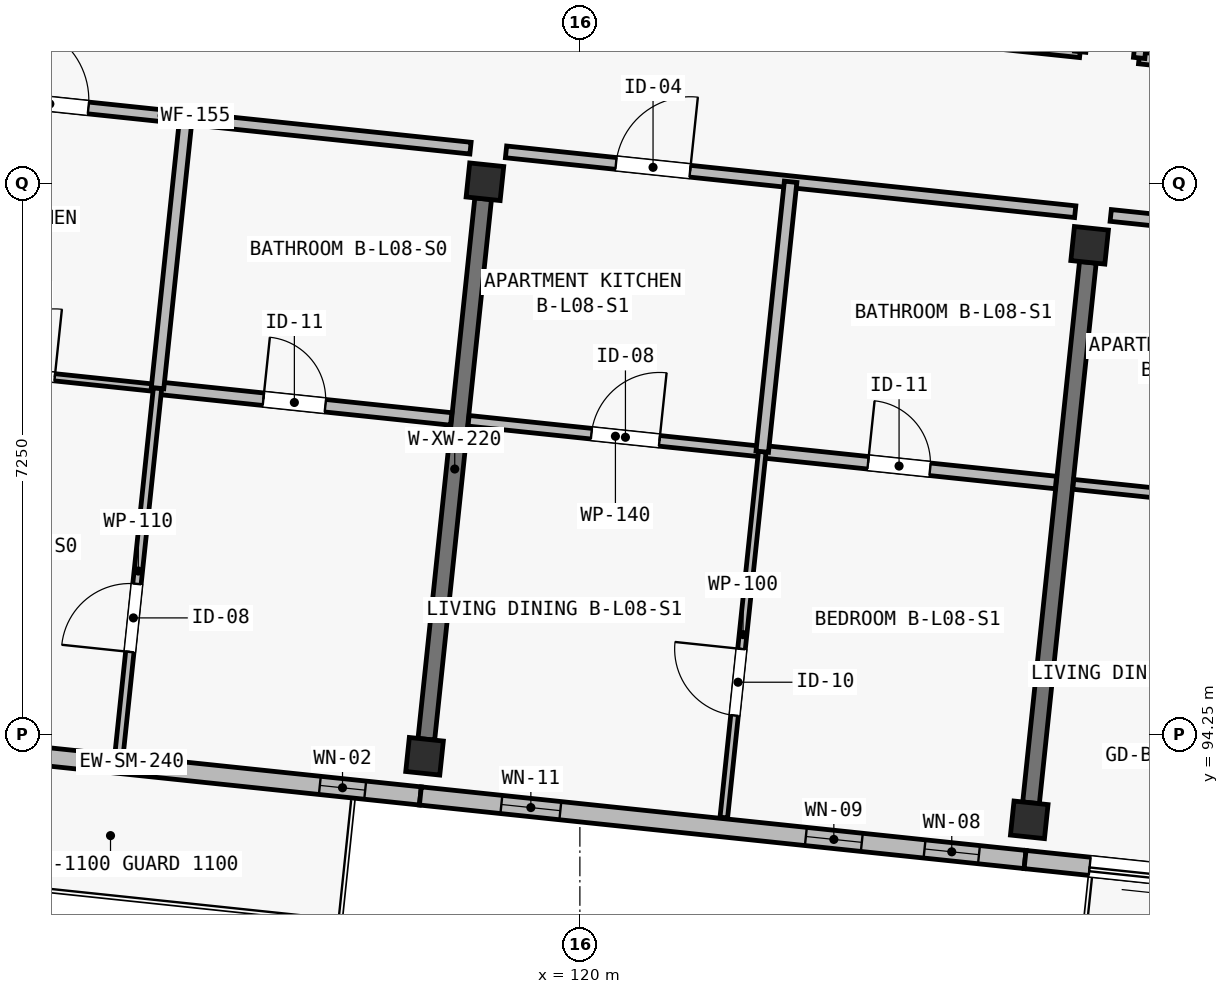
"""IFC4 building model, lengths in metres.
Left out: names, types, materials, properties, quantities, classifications, styles, units other than length and angle.
Written with IfcOpenShell. Run it as: python <this file> out.ifc"""

import sys

from ifc_helpers import new_model, si_unit, direction, frame, frame_2d, origin, origin_2d, place, context, subcontext, project, spatial, rectangle, extrude, element, fill, save


model = new_model("IFC4")
c1 = context("Model", 3, precision=1e-05, world=origin(), true_north=direction((0.0, 1.0)))
c2 = subcontext(c1, "Body", "Model", "MODEL_VIEW")
j1 = project(units=[si_unit("LENGTHUNIT", "METRE"), si_unit("PLANEANGLEUNIT", "RADIAN")], contexts=[c1])
p1 = place(None, origin())
s1 = spatial("IfcSite", under=j1, at=p1, CompositionType="ELEMENT")
p2 = place(p1, origin())
s2 = spatial("IfcBuilding", under=s1, at=p2, CompositionType="ELEMENT")
p3 = place(p2, frame((0.0, 0.0, 27.9)))
s3 = spatial("IfcBuildingStorey", under=s2, at=p3, CompositionType="ELEMENT", Elevation=27.9)
for number, where, z_axis, x_axis in (
    (1, (117.956, 93.964, 0.0), (0.0, 0.0, 1.0), (0.995, -0.105, 0.0)),
    (2, (118.75, 101.522, 0.0), (0.0, 0.0, 1.0), (0.995, -0.105, 0.0)),
    (3, (125.912, 93.127, 0.0), (0.0, 0.0, 1.0), (0.995, -0.105, 0.0)),
    (4, (126.707, 100.686, 0.0), (0.0, 0.0, 1.0), (0.995, -0.105, 0.0)),
):
    element("IfcColumn", number, at=place(p3, frame(where, z_axis=z_axis, x_axis=x_axis)), inside=s3, PredefinedType="COLUMN", context=c2, shape_type="SweptSolid", body=[
        extrude(rectangle(XDim=0.45, YDim=0.45, at=origin_2d()), origin(), (0.0, 0.0, 1.0), 3.25),
    ])
p4 = place(p3, frame((117.98, 94.188, 0.0), z_axis=(0.0, 0.0, 1.0), x_axis=(0.104519481265, 0.994522839374, 0.0)))
e5 = element("IfcWall", 5, at=p4, inside=s3, PredefinedType="SHEAR", context=c2, shape_type="SweptSolid", body=[
    extrude(rectangle(XDim=7.15, YDim=0.22, at=frame_2d((3.575, 0.0))), origin(), (0.0, 0.0, 1.0), 2.5),
])
p5 = place(p3, frame((125.936, 93.351, 0.0), z_axis=(0.0, 0.0, 1.0), x_axis=(0.104553253602, 0.994519289487, 0.0)))
e6 = element("IfcWall", 6, at=p5, inside=s3, PredefinedType="SHEAR", context=c2, shape_type="SweptSolid", body=[
    extrude(rectangle(XDim=7.15, YDim=0.22, at=frame_2d((3.575, 0.0))), origin(), (0.0, 0.0, 1.0), 2.5),
])
p6 = place(p3, frame((117.901, 93.442, 0.0), z_axis=(0.0, 0.0, 1.0), x_axis=(-0.994521760736, 0.104529744196, 0.0)))
e7 = element("IfcWall", 7, at=p6, inside=s3, PredefinedType="SOLIDWALL", context=c2, shape_type="SweptSolid", body=[
    extrude(rectangle(XDim=8.525, YDim=0.24, at=frame_2d((4.262, 0.0))), origin(), (0.0, 0.0, 1.0), 3.0),
])
p7 = place(p6, frame((5.495, 0.0, 0.0)))
e8 = element("IfcOpeningElement", 8, at=p7, cuts=e7, PredefinedType="OPENING", context=c2, shape_type="SweptSolid", body=[
    extrude(rectangle(XDim=1.5, YDim=2.12, at=frame_2d((0.75, 1.06))), frame((0.0, 0.135, 0.0), z_axis=(0.0, -1.0, 0.0), x_axis=(1.0, 0.0, 0.0)), (0.0, 0.0, 1.0), 0.27),
])
p8 = place(p6, frame((0.73, 0.0, 0.5)))
e9 = element("IfcOpeningElement", 9, at=p8, cuts=e7, PredefinedType="OPENING", context=c2, shape_type="SweptSolid", body=[
    extrude(rectangle(XDim=0.6, YDim=2.22, at=frame_2d((0.3, 1.11))), frame((0.0, 0.135, 0.0), z_axis=(0.0, -1.0, 0.0), x_axis=(1.0, 0.0, 0.0)), (0.0, 0.0, 1.0), 0.27),
])
p9 = place(p3, frame((125.857, 92.605, 0.0), z_axis=(0.0, 0.0, 1.0), x_axis=(-0.994522329422, 0.104524333444, 0.0)))
e10 = element("IfcWall", 10, at=p9, inside=s3, PredefinedType="SOLIDWALL", context=c2, shape_type="SweptSolid", body=[
    extrude(rectangle(XDim=8.0, YDim=0.24, at=frame_2d((4.0, 0.0))), origin(), (0.0, 0.0, 1.0), 3.0),
])
p10 = place(p9, frame((0.61, 0.0, 0.42)))
e11 = element("IfcOpeningElement", 11, at=p10, cuts=e10, PredefinedType="OPENING", context=c2, shape_type="SweptSolid", body=[
    extrude(rectangle(XDim=0.72, YDim=2.16, at=frame_2d((0.36, 1.08))), frame((0.0, 0.135, 0.0), z_axis=(0.0, -1.0, 0.0), x_axis=(1.0, 0.0, 0.0)), (0.0, 0.0, 1.0), 0.27),
])
p11 = place(p9, frame((2.16, 0.0, 0.48)))
e12 = element("IfcOpeningElement", 12, at=p11, cuts=e10, PredefinedType="OPENING", context=c2, shape_type="SweptSolid", body=[
    extrude(rectangle(XDim=0.74, YDim=2.26, at=frame_2d((0.37, 1.13))), frame((0.0, 0.135, 0.0), z_axis=(0.0, -1.0, 0.0), x_axis=(1.0, 0.0, 0.0)), (0.0, 0.0, 1.0), 0.27),
])
p12 = place(p9, frame((6.148, 0.0, 0.42)))
e13 = element("IfcOpeningElement", 13, at=p12, cuts=e10, PredefinedType="OPENING", context=c2, shape_type="SweptSolid", body=[
    extrude(rectangle(XDim=0.78, YDim=2.2, at=frame_2d((0.39, 1.1))), frame((0.0, 0.135, 0.0), z_axis=(0.0, -1.0, 0.0), x_axis=(1.0, 0.0, 0.0)), (0.0, 0.0, 1.0), 0.27),
])
p13 = place(p3, frame((133.814, 91.769, 0.0), z_axis=(0.0, 0.0, 1.0), x_axis=(-0.994522662826, 0.104521161134, 0.0)))
e14 = element("IfcWall", 14, at=p13, inside=s3, PredefinedType="SOLIDWALL", context=c2, shape_type="SweptSolid", body=[
    extrude(rectangle(XDim=8.0, YDim=0.24, at=frame_2d((4.0, 0.0))), origin(), (0.0, 0.0, 1.0), 3.0),
])
p14 = place(p13, frame((5.345, 0.0, 0.0)))
e15 = element("IfcOpeningElement", 15, at=p14, cuts=e14, PredefinedType="OPENING", context=c2, shape_type="SweptSolid", body=[
    extrude(rectangle(XDim=1.8, YDim=2.12, at=frame_2d((0.9, 1.06))), frame((0.0, 0.135, 0.0), z_axis=(0.0, -1.0, 0.0), x_axis=(1.0, 0.0, 0.0)), (0.0, 0.0, 1.0), 0.27),
])
p15 = place(p13, frame((0.93, 0.0, 0.46)))
e16 = element("IfcOpeningElement", 16, at=p15, cuts=e14, PredefinedType="OPENING", context=c2, shape_type="SweptSolid", body=[
    extrude(rectangle(XDim=0.72, YDim=2.16, at=frame_2d((0.36, 1.08))), frame((0.0, 0.135, 0.0), z_axis=(0.0, -1.0, 0.0), x_axis=(1.0, 0.0, 0.0)), (0.0, 0.0, 1.0), 0.27),
])
p16 = place(p3, frame((110.446, 102.817, 0.0), z_axis=(0.0, 0.0, 1.0), x_axis=(0.994520852686, -0.104538383252, 0.0)))
e17 = element("IfcWall", 17, at=p16, inside=s3, PredefinedType="PARTITIONING", context=c2, shape_type="SweptSolid", body=[
    extrude(rectangle(XDim=8.16, YDim=0.155, at=frame_2d((4.08, 0.0))), origin(), (0.0, 0.0, 1.0), 2.97),
])
p17 = place(p16, frame((2.085, 0.0, 0.0)))
e18 = element("IfcOpeningElement", 18, at=p17, cuts=e17, PredefinedType="OPENING", context=c2, shape_type="SweptSolid", body=[
    extrude(rectangle(XDim=1.02, YDim=2.2, at=frame_2d((0.51, 1.1))), frame((0.0, 0.093, 0.0), z_axis=(0.0, -1.0, 0.0), x_axis=(1.0, 0.0, 0.0)), (0.0, 0.0, 1.0), 0.185),
])
p18 = place(p3, frame((110.072, 99.267, 0.0), z_axis=(0.0, 0.0, 1.0), x_axis=(0.994526434513, -0.104485267165, 0.0)))
e19 = element("IfcWall", 19, at=p18, inside=s3, PredefinedType="PARTITIONING", context=c2, shape_type="SweptSolid", body=[
    extrude(rectangle(XDim=4.395, YDim=0.095, at=frame_2d((2.198, 0.0))), origin(), (0.0, 0.0, 1.0), 2.97),
])
p19 = place(p18, frame((2.135, 0.0, 0.0)))
e20 = element("IfcOpeningElement", 20, at=p19, cuts=e19, PredefinedType="OPENING", context=c2, shape_type="SweptSolid", body=[
    extrude(rectangle(XDim=0.9, YDim=2.1, at=frame_2d((0.45, 1.05))), frame((0.0, 0.062, 0.0), z_axis=(0.0, -1.0, 0.0), x_axis=(1.0, 0.0, 0.0)), (0.0, 0.0, 1.0), 0.125),
])
p20 = place(p3, frame((114.443, 98.808, 0.0), z_axis=(0.0, 0.0, 1.0), x_axis=(0.994517154753, -0.104573557378, 0.0)))
e21 = element("IfcWall", 21, at=p20, inside=s3, PredefinedType="PLUMBINGWALL", context=c2, shape_type="SweptSolid", body=[
    extrude(rectangle(XDim=3.885, YDim=0.165, at=frame_2d((1.942, 0.0))), origin(), (0.0, 0.0, 1.0), 2.97),
])
p21 = place(p20, frame((1.4, 0.0, 0.0)))
e22 = element("IfcOpeningElement", 22, at=p21, cuts=e21, PredefinedType="OPENING", context=c2, shape_type="SweptSolid", body=[
    extrude(rectangle(XDim=0.82, YDim=2.08, at=frame_2d((0.41, 1.04))), frame((0.0, 0.097, 0.0), z_axis=(0.0, -1.0, 0.0), x_axis=(1.0, 0.0, 0.0)), (0.0, 0.0, 1.0), 0.195),
])
p22 = place(p3, frame((113.937, 93.994, 0.0), z_axis=(0.0, 0.0, 1.0), x_axis=(0.104566624716, 0.994517883698, 0.0)))
e23 = element("IfcWall", 23, at=p22, inside=s3, PredefinedType="PARTITIONING", context=c2, shape_type="SweptSolid", body=[
    extrude(rectangle(XDim=4.84, YDim=0.11, at=frame_2d((2.42, 0.0))), origin(), (0.0, 0.0, 1.0), 2.97),
])
p23 = place(p22, frame((1.35, 0.0, 0.0)))
e24 = element("IfcOpeningElement", 24, at=p23, cuts=e23, PredefinedType="OPENING", context=c2, shape_type="SweptSolid", body=[
    extrude(rectangle(XDim=0.9, YDim=2.1, at=frame_2d((0.45, 1.05))), frame((0.0, 0.07, 0.0), z_axis=(0.0, -1.0, 0.0), x_axis=(1.0, 0.0, 0.0)), (0.0, 0.0, 1.0), 0.14),
])
p24 = place(p3, frame((114.443, 98.808, 0.0), z_axis=(0.0, 0.0, 1.0), x_axis=(0.104499661737, 0.994524922109, 0.0)))
e25 = element("IfcWall", 25, at=p24, inside=s3, PredefinedType="PLUMBINGWALL", context=c2, shape_type="SweptSolid", body=[
    extrude(rectangle(XDim=3.57, YDim=0.165, at=frame_2d((1.785, 0.0))), origin(), (0.0, 0.0, 1.0), 2.97),
])
p25 = place(p3, frame((119.028, 101.915, 0.0), z_axis=(0.0, 0.0, 1.0), x_axis=(0.994521430918, -0.10453288212, 0.0)))
e26 = element("IfcWall", 26, at=p25, inside=s3, PredefinedType="PARTITIONING", context=c2, shape_type="SweptSolid", body=[
    extrude(rectangle(XDim=7.53, YDim=0.155, at=frame_2d((3.765, 0.0))), origin(), (0.0, 0.0, 1.0), 2.97),
])
p26 = place(p25, frame((1.455, 0.0, 0.0)))
e27 = element("IfcOpeningElement", 27, at=p26, cuts=e26, PredefinedType="OPENING", context=c2, shape_type="SweptSolid", body=[
    extrude(rectangle(XDim=0.98, YDim=2.15, at=frame_2d((0.49, 1.075))), frame((0.0, 0.093, 0.0), z_axis=(0.0, -1.0, 0.0), x_axis=(1.0, 0.0, 0.0)), (0.0, 0.0, 1.0), 0.185),
])
p27 = place(p3, frame((118.536, 98.377, 0.0), z_axis=(0.0, 0.0, 1.0), x_axis=(0.994517841934, -0.104567021925, 0.0)))
e28 = element("IfcWall", 28, at=p27, inside=s3, PredefinedType="PARTITIONING", context=c2, shape_type="SweptSolid", body=[
    extrude(rectangle(XDim=3.885, YDim=0.14, at=frame_2d((1.942, 0.0))), origin(), (0.0, 0.0, 1.0), 2.97),
])
p28 = place(p27, frame((1.625, 0.0, 0.0)))
e29 = element("IfcOpeningElement", 29, at=p28, cuts=e28, PredefinedType="OPENING", context=c2, shape_type="SweptSolid", body=[
    extrude(rectangle(XDim=0.9, YDim=2.1, at=frame_2d((0.45, 1.05))), frame((0.0, 0.085, 0.0), z_axis=(0.0, -1.0, 0.0), x_axis=(1.0, 0.0, 0.0)), (0.0, 0.0, 1.0), 0.17),
])
p29 = place(p3, frame((122.399, 97.971, 0.0), z_axis=(0.0, 0.0, 1.0), x_axis=(0.994524375082, -0.104504867671, 0.0)))
e30 = element("IfcWall", 30, at=p29, inside=s3, PredefinedType="PLUMBINGWALL", context=c2, shape_type="SweptSolid", body=[
    extrude(rectangle(XDim=3.885, YDim=0.165, at=frame_2d((1.942, 0.0))), origin(), (0.0, 0.0, 1.0), 2.97),
])
p30 = place(p29, frame((1.4, 0.0, 0.0)))
e31 = element("IfcOpeningElement", 31, at=p30, cuts=e30, PredefinedType="OPENING", context=c2, shape_type="SweptSolid", body=[
    extrude(rectangle(XDim=0.82, YDim=2.08, at=frame_2d((0.41, 1.04))), frame((0.0, 0.097, 0.0), z_axis=(0.0, -1.0, 0.0), x_axis=(1.0, 0.0, 0.0)), (0.0, 0.0, 1.0), 0.195),
])
p31 = place(p3, frame((121.894, 93.158, 0.0), z_axis=(0.0, 0.0, 1.0), x_axis=(0.104516733692, 0.994523128126, 0.0)))
e32 = element("IfcWall", 32, at=p31, inside=s3, PredefinedType="PARTITIONING", context=c2, shape_type="SweptSolid", body=[
    extrude(rectangle(XDim=4.84, YDim=0.1, at=frame_2d((2.42, 0.0))), origin(), (0.0, 0.0, 1.0), 2.97),
])
p32 = place(p31, frame((1.35, 0.0, 0.0)))
e33 = element("IfcOpeningElement", 33, at=p32, cuts=e32, PredefinedType="OPENING", context=c2, shape_type="SweptSolid", body=[
    extrude(rectangle(XDim=0.88, YDim=2.1, at=frame_2d((0.44, 1.05))), frame((0.0, 0.065, 0.0), z_axis=(0.0, -1.0, 0.0), x_axis=(1.0, 0.0, 0.0)), (0.0, 0.0, 1.0), 0.13),
])
p33 = place(p3, frame((122.399, 97.971, 0.0), z_axis=(0.0, 0.0, 1.0), x_axis=(0.104492554633, 0.994525668862, 0.0)))
e34 = element("IfcWall", 34, at=p33, inside=s3, PredefinedType="PLUMBINGWALL", context=c2, shape_type="SweptSolid", body=[
    extrude(rectangle(XDim=3.57, YDim=0.165, at=frame_2d((1.785, 0.0))), origin(), (0.0, 0.0, 1.0), 2.97),
])
p34 = place(p3, frame((126.984, 101.079, 0.0), z_axis=(0.0, 0.0, 1.0), x_axis=(0.994521785195, -0.104529511491, 0.0)))
e35 = element("IfcWall", 35, at=p34, inside=s3, PredefinedType="PARTITIONING", context=c2, shape_type="SweptSolid", body=[
    extrude(rectangle(XDim=7.53, YDim=0.155, at=frame_2d((3.765, 0.0))), origin(), (0.0, 0.0, 1.0), 2.97),
])
p35 = place(p34, frame((1.455, 0.0, 0.0)))
e36 = element("IfcOpeningElement", 36, at=p35, cuts=e35, PredefinedType="OPENING", context=c2, shape_type="SweptSolid", body=[
    extrude(rectangle(XDim=1.02, YDim=2.2, at=frame_2d((0.51, 1.1))), frame((0.0, 0.093, 0.0), z_axis=(0.0, -1.0, 0.0), x_axis=(1.0, 0.0, 0.0)), (0.0, 0.0, 1.0), 0.185),
])
p36 = place(p3, frame((126.492, 97.541, 0.0), z_axis=(0.0, 0.0, 1.0), x_axis=(0.994517154753, -0.104573557378, 0.0)))
e37 = element("IfcWall", 37, at=p36, inside=s3, PredefinedType="PARTITIONING", context=c2, shape_type="SweptSolid", body=[
    extrude(rectangle(XDim=3.885, YDim=0.13, at=frame_2d((1.942, 0.0))), origin(), (0.0, 0.0, 1.0), 2.97),
])
p37 = place(p36, frame((1.625, 0.0, 0.0)))
e38 = element("IfcOpeningElement", 38, at=p37, cuts=e37, PredefinedType="OPENING", context=c2, shape_type="SweptSolid", body=[
    extrude(rectangle(XDim=0.88, YDim=2.1, at=frame_2d((0.44, 1.05))), frame((0.0, 0.08, 0.0), z_axis=(0.0, -1.0, 0.0), x_axis=(1.0, 0.0, 0.0)), (0.0, 0.0, 1.0), 0.16),
])
p38 = place(p3, frame((119.402, 103.988, 0.0), z_axis=(0.0, 0.0, 1.0), x_axis=(0.994522671024, -0.104521083137, 0.0)))
e39 = element("IfcWall", 39, at=p38, inside=s3, PredefinedType="PARTITIONING", context=c2, shape_type="SweptSolid", body=[
    extrude(rectangle(XDim=7.22, YDim=0.155, at=frame_2d((3.61, 0.0))), origin(), (0.0, 0.0, 1.0), 2.97),
])
p39 = place(p38, frame((1.305, 0.0, 0.0)))
e40 = element("IfcOpeningElement", 40, at=p39, cuts=e39, PredefinedType="OPENING", context=c2, shape_type="SweptSolid", body=[
    extrude(rectangle(XDim=1.02, YDim=2.2, at=frame_2d((0.51, 1.1))), frame((0.0, 0.093, 0.0), z_axis=(0.0, -1.0, 0.0), x_axis=(1.0, 0.0, 0.0)), (0.0, 0.0, 1.0), 0.185),
])
p40 = place(p3, frame((126.582, 103.233, 0.0), z_axis=(0.0, 0.0, 1.0), x_axis=(0.10453284543, 0.994521434775, 0.0)))
e41 = element("IfcWall", 41, at=p40, inside=s3, PredefinedType="PARTITIONING", context=c2, shape_type="SweptSolid", body=[
    extrude(rectangle(XDim=9.87, YDim=0.15, at=frame_2d((4.935, 0.0))), origin(), (0.0, 0.0, 1.0), 2.97),
])
p41 = place(p3, frame((127.358, 103.151, 0.0), z_axis=(0.0, 0.0, 1.0), x_axis=(0.994522671024, -0.104521083137, 0.0)))
e42 = element("IfcWall", 42, at=p41, inside=s3, PredefinedType="PARTITIONING", context=c2, shape_type="SweptSolid", body=[
    extrude(rectangle(XDim=7.22, YDim=0.155, at=frame_2d((3.61, 0.0))), origin(), (0.0, 0.0, 1.0), 2.97),
])
p42 = place(p41, frame((1.305, 0.0, 0.0)))
e43 = element("IfcOpeningElement", 43, at=p42, cuts=e42, PredefinedType="OPENING", context=c2, shape_type="SweptSolid", body=[
    extrude(rectangle(XDim=0.98, YDim=2.15, at=frame_2d((0.49, 1.075))), frame((0.0, 0.093, 0.0), z_axis=(0.0, -1.0, 0.0), x_axis=(1.0, 0.0, 0.0)), (0.0, 0.0, 1.0), 0.185),
])
p43 = place(p3, frame((127.358, 103.151, 0.0), z_axis=(0.0, 0.0, 1.0), x_axis=(0.104508379977, 0.994524006002, 0.0)))
e44 = element("IfcWall", 44, at=p43, inside=s3, PredefinedType="PARTITIONING", context=c2, shape_type="SweptSolid", body=[
    extrude(rectangle(XDim=9.87, YDim=0.15, at=frame_2d((4.935, 0.0))), origin(), (0.0, 0.0, 1.0), 2.97),
])
p44 = place(p8, origin())
e45 = element("IfcWindow", 45, at=p44, inside=s3, PartitioningType="SINGLE_PANEL", PredefinedType="WINDOW", context=c2, shape_type="SweptSolid", body=[
    extrude(rectangle(XDim=0.6, YDim=2.22, at=frame_2d((0.3, 1.11))), frame((0.0, 0.03, 0.0), z_axis=(0.0, -1.0, 0.0), x_axis=(1.0, 0.0, 0.0)), (0.0, 0.0, 1.0), 0.06),
])
fill(e9, e45)
p45 = place(p10, origin())
e46 = element("IfcWindow", 46, at=p45, inside=s3, PartitioningType="SINGLE_PANEL", PredefinedType="WINDOW", context=c2, shape_type="SweptSolid", body=[
    extrude(rectangle(XDim=0.72, YDim=2.16, at=frame_2d((0.36, 1.08))), frame((0.0, 0.03, 0.0), z_axis=(0.0, -1.0, 0.0), x_axis=(1.0, 0.0, 0.0)), (0.0, 0.0, 1.0), 0.06),
])
fill(e11, e46)
p46 = place(p11, origin())
e47 = element("IfcWindow", 47, at=p46, inside=s3, PartitioningType="SINGLE_PANEL", PredefinedType="WINDOW", context=c2, shape_type="SweptSolid", body=[
    extrude(rectangle(XDim=0.74, YDim=2.26, at=frame_2d((0.37, 1.13))), frame((0.0, 0.03, 0.0), z_axis=(0.0, -1.0, 0.0), x_axis=(1.0, 0.0, 0.0)), (0.0, 0.0, 1.0), 0.06),
])
fill(e12, e47)
p47 = place(p12, origin())
e48 = element("IfcWindow", 48, at=p47, inside=s3, PartitioningType="SINGLE_PANEL", PredefinedType="WINDOW", context=c2, shape_type="SweptSolid", body=[
    extrude(rectangle(XDim=0.78, YDim=2.2, at=frame_2d((0.39, 1.1))), frame((0.0, 0.03, 0.0), z_axis=(0.0, -1.0, 0.0), x_axis=(1.0, 0.0, 0.0)), (0.0, 0.0, 1.0), 0.06),
])
fill(e13, e48)
p48 = place(p14, origin())
e49 = element("IfcDoor", 49, at=p48, inside=s3, OperationType="SLIDING_TO_LEFT", PredefinedType="DOOR", context=c2, shape_type="SweptSolid", body=[
    extrude(rectangle(XDim=1.8, YDim=2.12, at=frame_2d((0.9, 1.06))), frame((0.0, 0.025, 0.0), z_axis=(0.0, -1.0, 0.0), x_axis=(1.0, 0.0, 0.0)), (0.0, 0.0, 1.0), 0.05),
])
fill(e15, e49)
p49 = place(p17, origin())
e50 = element("IfcDoor", 50, at=p49, inside=s3, OperationType="SINGLE_SWING_LEFT", PredefinedType="DOOR", context=c2, shape_type="SweptSolid", body=[
    extrude(rectangle(XDim=1.02, YDim=2.2, at=frame_2d((0.51, 1.1))), frame((0.0, 0.025, 0.0), z_axis=(0.0, -1.0, 0.0), x_axis=(1.0, 0.0, 0.0)), (0.0, 0.0, 1.0), 0.05),
])
fill(e18, e50)
p50 = place(p19, origin())
e51 = element("IfcDoor", 51, at=p50, inside=s3, OperationType="SINGLE_SWING_RIGHT", PredefinedType="DOOR", context=c2, shape_type="SweptSolid", body=[
    extrude(rectangle(XDim=0.9, YDim=2.1, at=frame_2d((0.45, 1.05))), frame((0.0, 0.025, 0.0), z_axis=(0.0, -1.0, 0.0), x_axis=(1.0, 0.0, 0.0)), (0.0, 0.0, 1.0), 0.05),
])
fill(e20, e51)
p51 = place(p21, origin())
e52 = element("IfcDoor", 52, at=p51, inside=s3, OperationType="SINGLE_SWING_LEFT", PredefinedType="DOOR", context=c2, shape_type="SweptSolid", body=[
    extrude(rectangle(XDim=0.82, YDim=2.08, at=frame_2d((0.41, 1.04))), frame((0.0, 0.025, 0.0), z_axis=(0.0, -1.0, 0.0), x_axis=(1.0, 0.0, 0.0)), (0.0, 0.0, 1.0), 0.05),
])
fill(e22, e52)
p52 = place(p23, origin())
e53 = element("IfcDoor", 53, at=p52, inside=s3, OperationType="SINGLE_SWING_LEFT", PredefinedType="DOOR", context=c2, shape_type="SweptSolid", body=[
    extrude(rectangle(XDim=0.9, YDim=2.1, at=frame_2d((0.45, 1.05))), frame((0.0, 0.025, 0.0), z_axis=(0.0, -1.0, 0.0), x_axis=(1.0, 0.0, 0.0)), (0.0, 0.0, 1.0), 0.05),
])
fill(e24, e53)
p53 = place(p26, origin())
e54 = element("IfcDoor", 54, at=p53, inside=s3, OperationType="SINGLE_SWING_RIGHT", PredefinedType="DOOR", context=c2, shape_type="SweptSolid", body=[
    extrude(rectangle(XDim=0.98, YDim=2.15, at=frame_2d((0.49, 1.075))), frame((0.0, 0.025, 0.0), z_axis=(0.0, -1.0, 0.0), x_axis=(1.0, 0.0, 0.0)), (0.0, 0.0, 1.0), 0.05),
])
fill(e27, e54)
p54 = place(p28, origin())
e55 = element("IfcDoor", 55, at=p54, inside=s3, OperationType="SINGLE_SWING_RIGHT", PredefinedType="DOOR", context=c2, shape_type="SweptSolid", body=[
    extrude(rectangle(XDim=0.9, YDim=2.1, at=frame_2d((0.45, 1.05))), frame((0.0, 0.025, 0.0), z_axis=(0.0, -1.0, 0.0), x_axis=(1.0, 0.0, 0.0)), (0.0, 0.0, 1.0), 0.05),
])
fill(e29, e55)
p55 = place(p30, origin())
e56 = element("IfcDoor", 56, at=p55, inside=s3, OperationType="SINGLE_SWING_LEFT", PredefinedType="DOOR", context=c2, shape_type="SweptSolid", body=[
    extrude(rectangle(XDim=0.82, YDim=2.08, at=frame_2d((0.41, 1.04))), frame((0.0, 0.025, 0.0), z_axis=(0.0, -1.0, 0.0), x_axis=(1.0, 0.0, 0.0)), (0.0, 0.0, 1.0), 0.05),
])
fill(e31, e56)
p56 = place(p32, origin())
e57 = element("IfcDoor", 57, at=p56, inside=s3, OperationType="SINGLE_SWING_RIGHT", PredefinedType="DOOR", context=c2, shape_type="SweptSolid", body=[
    extrude(rectangle(XDim=0.88, YDim=2.1, at=frame_2d((0.44, 1.05))), frame((0.0, 0.025, 0.0), z_axis=(0.0, -1.0, 0.0), x_axis=(1.0, 0.0, 0.0)), (0.0, 0.0, 1.0), 0.05),
])
fill(e33, e57)
save(model, sys.argv[1])
